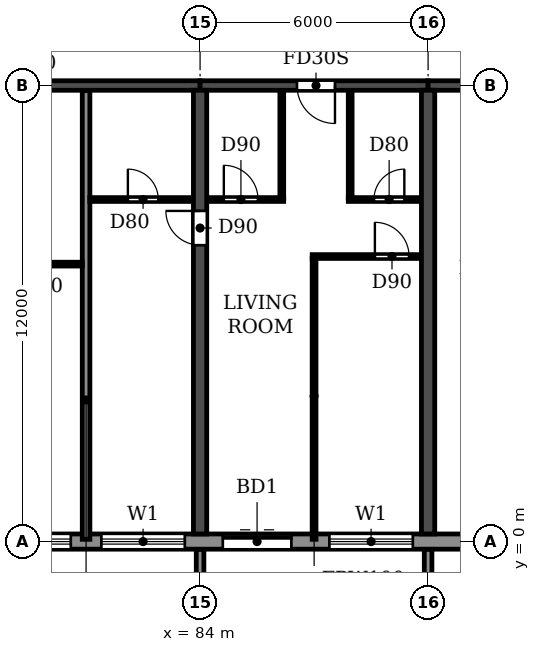
"""IFC4 building model, lengths in metres.
Left out: names, types, materials, properties, quantities, classifications, styles, units other than length and angle.
Written with IfcOpenShell. Run it as: python <this file> out.ifc"""

import sys

from ifc_helpers import new_model, si_unit, direction, frame, frame_2d, origin, place, context, subcontext, project, spatial, polyline, rectangle, outline, extrude, source, transform, mapped, element, fill, save


model = new_model("IFC4")
c1 = context("Model", 3, precision=1e-05, world=origin(), true_north=direction((0.0, 1.0)))
c2 = subcontext(c1, "Body", "Model", "MODEL_VIEW")
j1 = project(units=[si_unit("LENGTHUNIT", "METRE"), si_unit("PLANEANGLEUNIT", "RADIAN")], contexts=[c1])
p1 = place(None, origin())
s1 = spatial("IfcSite", under=j1, at=p1, CompositionType="ELEMENT")
p2 = place(p1, origin())
s2 = spatial("IfcBuilding", under=s1, at=p2, CompositionType="ELEMENT")
p3 = place(p2, frame((0.0, 0.0, 72.9)))
s3 = spatial("IfcBuildingStorey", under=s2, at=p3, CompositionType="ELEMENT", Elevation=72.9)
p4 = place(p3, frame((84.0, 0.2, 0.0), z_axis=(0.0, 0.0, 1.0), x_axis=(0.0, 1.0, 0.0)))
e1 = element("IfcWall", 1, at=p4, inside=s3, PredefinedType="SHEAR", context=c2, shape_type="SweptSolid", body=[
    extrude(rectangle(XDim=11.675, YDim=0.35, at=frame_2d((5.837, 0.0))), origin(), (0.0, 0.0, 1.0), 3.06),
])
p5 = place(p4, frame((7.6, 0.0, 0.0)))
e2 = element("IfcOpeningElement", 2, at=p5, cuts=e1, PredefinedType="OPENING", context=c2, shape_type="SweptSolid", body=[
    extrude(rectangle(XDim=0.9, YDim=2.1, at=frame_2d((0.45, 1.05))), frame((0.0, 0.185, 0.0), z_axis=(0.0, -1.0, 0.0), x_axis=(1.0, 0.0, 0.0)), (0.0, 0.0, 1.0), 0.37),
])
p6 = place(p3, frame((90.0, 0.2, 0.0), z_axis=(0.0, 0.0, 1.0), x_axis=(0.0, 1.0, 0.0)))
e3 = element("IfcWall", 3, at=p6, inside=s3, PredefinedType="SHEAR", context=c2, shape_type="SweptSolid", body=[
    extrude(rectangle(XDim=11.675, YDim=0.35, at=frame_2d((5.837, 0.0))), origin(), (0.0, 0.0, 1.0), 3.06),
])
p7 = place(p3, frame((78.0, 12.0, 0.0), z_axis=(0.0, 0.0, 1.0), x_axis=(1.0, 0.0, 0.0)))
e4 = element("IfcWall", 4, at=p7, inside=s3, PredefinedType="SHEAR", context=c2, shape_type="SweptSolid", body=[
    extrude(rectangle(XDim=6.0, YDim=0.25, at=frame_2d((3.0, 0.0))), origin(), (0.0, 0.0, 1.0), 2.46),
])
p8 = place(p3, frame((84.0, 12.0, 0.0), z_axis=(0.0, 0.0, 1.0), x_axis=(1.0, 0.0, 0.0)))
e5 = element("IfcWall", 5, at=p8, inside=s3, PredefinedType="SHEAR", context=c2, shape_type="SweptSolid", body=[
    extrude(rectangle(XDim=6.0, YDim=0.25, at=frame_2d((3.0, 0.0))), origin(), (0.0, 0.0, 1.0), 2.46),
])
p9 = place(p8, frame((2.55, 0.0, 0.0)))
e6 = element("IfcOpeningElement", 6, at=p9, cuts=e5, PredefinedType="OPENING", context=c2, shape_type="SweptSolid", body=[
    extrude(rectangle(XDim=1.0, YDim=2.1, at=frame_2d((0.5, 1.05))), frame((0.0, 0.135, 0.0), z_axis=(0.0, -1.0, 0.0), x_axis=(1.0, 0.0, 0.0)), (0.0, 0.0, 1.0), 0.27),
])
p10 = place(p3, frame((90.0, 12.0, 0.0), z_axis=(0.0, 0.0, 1.0), x_axis=(1.0, 0.0, 0.0)))
e7 = element("IfcWall", 7, at=p10, inside=s3, PredefinedType="SHEAR", context=c2, shape_type="SweptSolid", body=[
    extrude(rectangle(XDim=5.8, YDim=0.25, at=frame_2d((2.9, 0.0))), origin(), (0.0, 0.0, 1.0), 2.46),
])
p11 = place(p10, frame((2.5, 0.0, 0.0)))
e8 = element("IfcOpeningElement", 8, at=p11, cuts=e7, PredefinedType="OPENING", context=c2, shape_type="SweptSolid", body=[
    extrude(rectangle(XDim=1.0, YDim=2.1, at=frame_2d((0.5, 1.05))), frame((0.0, 0.135, 0.0), z_axis=(0.0, -1.0, 0.0), x_axis=(1.0, 0.0, 0.0)), (0.0, 0.0, 1.0), 0.27),
])
p12 = place(p3, frame((10.683, 0.0, 0.0), z_axis=(0.0, 0.0, 1.0), x_axis=(1.0, 0.0, 0.0)))
e9 = element("IfcWall", 9, at=p12, inside=s3, PredefinedType="STANDARD", context=c2, shape_type="SweptSolid", body=[
    extrude(rectangle(XDim=80.634, YDim=0.4, at=frame_2d((40.317, 0.0))), origin(), (0.0, 0.0, 1.0), 3.06),
])
p13 = place(p12, frame((1.717, 0.0, 0.9)))
e10 = element("IfcOpeningElement", 10, at=p13, cuts=e9, PredefinedType="OPENING", context=c2, shape_type="SweptSolid", body=[
    extrude(rectangle(XDim=2.2, YDim=1.5, at=frame_2d((1.1, 0.75))), frame((0.0, 0.21, 0.0), z_axis=(0.0, -1.0, 0.0), x_axis=(1.0, 0.0, 0.0)), (0.0, 0.0, 1.0), 0.42),
])
p14 = place(p12, frame((4.917, 0.0, 0.0)))
e11 = element("IfcOpeningElement", 11, at=p14, cuts=e9, PredefinedType="OPENING", context=c2, shape_type="SweptSolid", body=[
    extrude(rectangle(XDim=1.8, YDim=2.4, at=frame_2d((0.9, 1.2))), frame((0.0, 0.21, 0.0), z_axis=(0.0, -1.0, 0.0), x_axis=(1.0, 0.0, 0.0)), (0.0, 0.0, 1.0), 0.42),
])
p15 = place(p12, frame((7.717, 0.0, 0.9)))
e12 = element("IfcOpeningElement", 12, at=p15, cuts=e9, PredefinedType="OPENING", context=c2, shape_type="SweptSolid", body=[
    extrude(rectangle(XDim=2.2, YDim=1.5, at=frame_2d((1.1, 0.75))), frame((0.0, 0.21, 0.0), z_axis=(0.0, -1.0, 0.0), x_axis=(1.0, 0.0, 0.0)), (0.0, 0.0, 1.0), 0.42),
])
p16 = place(p12, frame((10.717, 0.0, 0.9)))
e13 = element("IfcOpeningElement", 13, at=p16, cuts=e9, PredefinedType="OPENING", context=c2, shape_type="SweptSolid", body=[
    extrude(rectangle(XDim=2.2, YDim=1.5, at=frame_2d((1.1, 0.75))), frame((0.0, 0.21, 0.0), z_axis=(0.0, -1.0, 0.0), x_axis=(1.0, 0.0, 0.0)), (0.0, 0.0, 1.0), 0.42),
])
p17 = place(p12, frame((13.717, 0.0, 0.9)))
e14 = element("IfcOpeningElement", 14, at=p17, cuts=e9, PredefinedType="OPENING", context=c2, shape_type="SweptSolid", body=[
    extrude(rectangle(XDim=2.2, YDim=1.5, at=frame_2d((1.1, 0.75))), frame((0.0, 0.21, 0.0), z_axis=(0.0, -1.0, 0.0), x_axis=(1.0, 0.0, 0.0)), (0.0, 0.0, 1.0), 0.42),
])
p18 = place(p12, frame((16.917, 0.0, 0.0)))
e15 = element("IfcOpeningElement", 15, at=p18, cuts=e9, PredefinedType="OPENING", context=c2, shape_type="SweptSolid", body=[
    extrude(rectangle(XDim=1.8, YDim=2.4, at=frame_2d((0.9, 1.2))), frame((0.0, 0.21, 0.0), z_axis=(0.0, -1.0, 0.0), x_axis=(1.0, 0.0, 0.0)), (0.0, 0.0, 1.0), 0.42),
])
p19 = place(p12, frame((19.717, 0.0, 0.9)))
e16 = element("IfcOpeningElement", 16, at=p19, cuts=e9, PredefinedType="OPENING", context=c2, shape_type="SweptSolid", body=[
    extrude(rectangle(XDim=2.2, YDim=1.5, at=frame_2d((1.1, 0.75))), frame((0.0, 0.21, 0.0), z_axis=(0.0, -1.0, 0.0), x_axis=(1.0, 0.0, 0.0)), (0.0, 0.0, 1.0), 0.42),
])
p20 = place(p12, frame((22.717, 0.0, 0.9)))
e17 = element("IfcOpeningElement", 17, at=p20, cuts=e9, PredefinedType="OPENING", context=c2, shape_type="SweptSolid", body=[
    extrude(rectangle(XDim=2.2, YDim=1.5, at=frame_2d((1.1, 0.75))), frame((0.0, 0.21, 0.0), z_axis=(0.0, -1.0, 0.0), x_axis=(1.0, 0.0, 0.0)), (0.0, 0.0, 1.0), 0.42),
])
p21 = place(p12, frame((25.917, 0.0, 0.0)))
e18 = element("IfcOpeningElement", 18, at=p21, cuts=e9, PredefinedType="OPENING", context=c2, shape_type="SweptSolid", body=[
    extrude(rectangle(XDim=1.8, YDim=2.4, at=frame_2d((0.9, 1.2))), frame((0.0, 0.21, 0.0), z_axis=(0.0, -1.0, 0.0), x_axis=(1.0, 0.0, 0.0)), (0.0, 0.0, 1.0), 0.42),
])
p22 = place(p12, frame((28.717, 0.0, 0.9)))
e19 = element("IfcOpeningElement", 19, at=p22, cuts=e9, PredefinedType="OPENING", context=c2, shape_type="SweptSolid", body=[
    extrude(rectangle(XDim=2.2, YDim=1.5, at=frame_2d((1.1, 0.75))), frame((0.0, 0.21, 0.0), z_axis=(0.0, -1.0, 0.0), x_axis=(1.0, 0.0, 0.0)), (0.0, 0.0, 1.0), 0.42),
])
p23 = place(p12, frame((31.717, 0.0, 0.9)))
e20 = element("IfcOpeningElement", 20, at=p23, cuts=e9, PredefinedType="OPENING", context=c2, shape_type="SweptSolid", body=[
    extrude(rectangle(XDim=2.2, YDim=1.5, at=frame_2d((1.1, 0.75))), frame((0.0, 0.21, 0.0), z_axis=(0.0, -1.0, 0.0), x_axis=(1.0, 0.0, 0.0)), (0.0, 0.0, 1.0), 0.42),
])
p24 = place(p12, frame((34.717, 0.0, 0.9)))
e21 = element("IfcOpeningElement", 21, at=p24, cuts=e9, PredefinedType="OPENING", context=c2, shape_type="SweptSolid", body=[
    extrude(rectangle(XDim=2.2, YDim=1.5, at=frame_2d((1.1, 0.75))), frame((0.0, 0.21, 0.0), z_axis=(0.0, -1.0, 0.0), x_axis=(1.0, 0.0, 0.0)), (0.0, 0.0, 1.0), 0.42),
])
p25 = place(p12, frame((37.917, 0.0, 0.0)))
e22 = element("IfcOpeningElement", 22, at=p25, cuts=e9, PredefinedType="OPENING", context=c2, shape_type="SweptSolid", body=[
    extrude(rectangle(XDim=1.8, YDim=2.4, at=frame_2d((0.9, 1.2))), frame((0.0, 0.21, 0.0), z_axis=(0.0, -1.0, 0.0), x_axis=(1.0, 0.0, 0.0)), (0.0, 0.0, 1.0), 0.42),
])
p26 = place(p12, frame((40.717, 0.0, 0.9)))
e23 = element("IfcOpeningElement", 23, at=p26, cuts=e9, PredefinedType="OPENING", context=c2, shape_type="SweptSolid", body=[
    extrude(rectangle(XDim=2.2, YDim=1.5, at=frame_2d((1.1, 0.75))), frame((0.0, 0.21, 0.0), z_axis=(0.0, -1.0, 0.0), x_axis=(1.0, 0.0, 0.0)), (0.0, 0.0, 1.0), 0.42),
])
p27 = place(p12, frame((43.717, 0.0, 0.9)))
e24 = element("IfcOpeningElement", 24, at=p27, cuts=e9, PredefinedType="OPENING", context=c2, shape_type="SweptSolid", body=[
    extrude(rectangle(XDim=2.2, YDim=1.5, at=frame_2d((1.1, 0.75))), frame((0.0, 0.21, 0.0), z_axis=(0.0, -1.0, 0.0), x_axis=(1.0, 0.0, 0.0)), (0.0, 0.0, 1.0), 0.42),
])
p28 = place(p12, frame((46.717, 0.0, 0.9)))
e25 = element("IfcOpeningElement", 25, at=p28, cuts=e9, PredefinedType="OPENING", context=c2, shape_type="SweptSolid", body=[
    extrude(rectangle(XDim=2.2, YDim=1.5, at=frame_2d((1.1, 0.75))), frame((0.0, 0.21, 0.0), z_axis=(0.0, -1.0, 0.0), x_axis=(1.0, 0.0, 0.0)), (0.0, 0.0, 1.0), 0.42),
])
p29 = place(p12, frame((49.917, 0.0, 0.0)))
e26 = element("IfcOpeningElement", 26, at=p29, cuts=e9, PredefinedType="OPENING", context=c2, shape_type="SweptSolid", body=[
    extrude(rectangle(XDim=1.8, YDim=2.4, at=frame_2d((0.9, 1.2))), frame((0.0, 0.21, 0.0), z_axis=(0.0, -1.0, 0.0), x_axis=(1.0, 0.0, 0.0)), (0.0, 0.0, 1.0), 0.42),
])
p30 = place(p12, frame((52.717, 0.0, 0.9)))
e27 = element("IfcOpeningElement", 27, at=p30, cuts=e9, PredefinedType="OPENING", context=c2, shape_type="SweptSolid", body=[
    extrude(rectangle(XDim=2.2, YDim=1.5, at=frame_2d((1.1, 0.75))), frame((0.0, 0.21, 0.0), z_axis=(0.0, -1.0, 0.0), x_axis=(1.0, 0.0, 0.0)), (0.0, 0.0, 1.0), 0.42),
])
p31 = place(p12, frame((55.717, 0.0, 0.9)))
e28 = element("IfcOpeningElement", 28, at=p31, cuts=e9, PredefinedType="OPENING", context=c2, shape_type="SweptSolid", body=[
    extrude(rectangle(XDim=2.2, YDim=1.5, at=frame_2d((1.1, 0.75))), frame((0.0, 0.21, 0.0), z_axis=(0.0, -1.0, 0.0), x_axis=(1.0, 0.0, 0.0)), (0.0, 0.0, 1.0), 0.42),
])
p32 = place(p12, frame((58.717, 0.0, 0.9)))
e29 = element("IfcOpeningElement", 29, at=p32, cuts=e9, PredefinedType="OPENING", context=c2, shape_type="SweptSolid", body=[
    extrude(rectangle(XDim=2.2, YDim=1.5, at=frame_2d((1.1, 0.75))), frame((0.0, 0.21, 0.0), z_axis=(0.0, -1.0, 0.0), x_axis=(1.0, 0.0, 0.0)), (0.0, 0.0, 1.0), 0.42),
])
p33 = place(p12, frame((61.717, 0.0, 0.9)))
e30 = element("IfcOpeningElement", 30, at=p33, cuts=e9, PredefinedType="OPENING", context=c2, shape_type="SweptSolid", body=[
    extrude(rectangle(XDim=2.2, YDim=1.5, at=frame_2d((1.1, 0.75))), frame((0.0, 0.21, 0.0), z_axis=(0.0, -1.0, 0.0), x_axis=(1.0, 0.0, 0.0)), (0.0, 0.0, 1.0), 0.42),
])
p34 = place(p12, frame((64.917, 0.0, 0.0)))
e31 = element("IfcOpeningElement", 31, at=p34, cuts=e9, PredefinedType="OPENING", context=c2, shape_type="SweptSolid", body=[
    extrude(rectangle(XDim=1.8, YDim=2.4, at=frame_2d((0.9, 1.2))), frame((0.0, 0.21, 0.0), z_axis=(0.0, -1.0, 0.0), x_axis=(1.0, 0.0, 0.0)), (0.0, 0.0, 1.0), 0.42),
])
p35 = place(p12, frame((67.717, 0.0, 0.9)))
e32 = element("IfcOpeningElement", 32, at=p35, cuts=e9, PredefinedType="OPENING", context=c2, shape_type="SweptSolid", body=[
    extrude(rectangle(XDim=2.2, YDim=1.5, at=frame_2d((1.1, 0.75))), frame((0.0, 0.21, 0.0), z_axis=(0.0, -1.0, 0.0), x_axis=(1.0, 0.0, 0.0)), (0.0, 0.0, 1.0), 0.42),
])
p36 = place(p12, frame((70.717, 0.0, 0.9)))
e33 = element("IfcOpeningElement", 33, at=p36, cuts=e9, PredefinedType="OPENING", context=c2, shape_type="SweptSolid", body=[
    extrude(rectangle(XDim=2.2, YDim=1.5, at=frame_2d((1.1, 0.75))), frame((0.0, 0.21, 0.0), z_axis=(0.0, -1.0, 0.0), x_axis=(1.0, 0.0, 0.0)), (0.0, 0.0, 1.0), 0.42),
])
p37 = place(p12, frame((73.917, 0.0, 0.0)))
e34 = element("IfcOpeningElement", 34, at=p37, cuts=e9, PredefinedType="OPENING", context=c2, shape_type="SweptSolid", body=[
    extrude(rectangle(XDim=1.8, YDim=2.4, at=frame_2d((0.9, 1.2))), frame((0.0, 0.21, 0.0), z_axis=(0.0, -1.0, 0.0), x_axis=(1.0, 0.0, 0.0)), (0.0, 0.0, 1.0), 0.42),
])
p38 = place(p12, frame((76.717, 0.0, 0.9)))
e35 = element("IfcOpeningElement", 35, at=p38, cuts=e9, PredefinedType="OPENING", context=c2, shape_type="SweptSolid", body=[
    extrude(rectangle(XDim=2.2, YDim=1.5, at=frame_2d((1.1, 0.75))), frame((0.0, 0.21, 0.0), z_axis=(0.0, -1.0, 0.0), x_axis=(1.0, 0.0, 0.0)), (0.0, 0.0, 1.0), 0.42),
])
m1 = source(origin(), c2, "Body", "SweptSolid", [
    extrude(outline(polyline([(0.0, 0.0), (0.2, 0.0), (0.2, 1.65), (0.0, 1.65), (0.0, 0.0)])), origin(), (0.0, 0.0, 1.0), 3.1),
])
for number, where in (
    (36, (83.9, -1.85, 0.0)),
    (37, (89.9, -1.85, 0.0)),
):
    element("IfcWall", number, at=place(p3, frame(where)), inside=s3, PredefinedType="STANDARD", context=c2, shape_type="MappedRepresentation", body=[
        mapped(m1, transform((0.0, 0.0, 0.0))),
    ])
p39 = place(p3, frame((81.0, 0.06, 0.0), z_axis=(0.0, 0.0, 1.0), x_axis=(0.0, 1.0, 0.0)))
e38 = element("IfcWall", 38, at=p39, inside=s3, PredefinedType="PARTITIONING", context=c2, shape_type="SweptSolid", body=[
    extrude(rectangle(XDim=11.805, YDim=0.2, at=frame_2d((5.902, 0.0))), origin(), (0.0, 0.0, 1.0), 3.06),
])
p40 = place(p3, frame((78.185, 7.3, 0.0), z_axis=(0.0, 0.0, 1.0), x_axis=(1.0, 0.0, 0.0)))
e39 = element("IfcWall", 39, at=p40, inside=s3, PredefinedType="PARTITIONING", context=c2, shape_type="SweptSolid", body=[
    extrude(rectangle(XDim=2.715, YDim=0.1, at=frame_2d((1.357, 0.0))), origin(), (0.0, 0.0, 1.0), 3.06),
])
p41 = place(p40, frame((0.915, 0.0, 0.0)))
e40 = element("IfcOpeningElement", 40, at=p41, cuts=e39, PredefinedType="OPENING", context=c2, shape_type="SweptSolid", body=[
    extrude(rectangle(XDim=0.8, YDim=2.1, at=frame_2d((0.4, 1.05))), frame((0.0, 0.06, 0.0), z_axis=(0.0, -1.0, 0.0), x_axis=(1.0, 0.0, 0.0)), (0.0, 0.0, 1.0), 0.12),
])
p42 = place(p3, frame((86.95, 7.5, 0.0), z_axis=(0.0, 0.0, 1.0), x_axis=(1.0, 0.0, 0.0)))
e41 = element("IfcWall", 41, at=p42, inside=s3, PredefinedType="PARTITIONING", context=c2, shape_type="SweptSolid", body=[
    extrude(rectangle(XDim=2.865, YDim=0.1, at=frame_2d((1.433, 0.0))), origin(), (0.0, 0.0, 1.0), 3.06),
])
p43 = place(p42, frame((1.65, 0.0, 0.0)))
e42 = element("IfcOpeningElement", 42, at=p43, cuts=e41, PredefinedType="OPENING", context=c2, shape_type="SweptSolid", body=[
    extrude(rectangle(XDim=0.9, YDim=2.1, at=frame_2d((0.45, 1.05))), frame((0.0, 0.06, 0.0), z_axis=(0.0, -1.0, 0.0), x_axis=(1.0, 0.0, 0.0)), (0.0, 0.0, 1.0), 0.12),
])
p44 = place(p3, frame((81.1, 9.0, 0.0), z_axis=(0.0, 0.0, 1.0), x_axis=(1.0, 0.0, 0.0)))
e43 = element("IfcWall", 43, at=p44, inside=s3, PredefinedType="PARTITIONING", context=c2, shape_type="SweptSolid", body=[
    extrude(rectangle(XDim=2.715, YDim=0.1, at=frame_2d((1.357, 0.0))), origin(), (0.0, 0.0, 1.0), 3.06),
])
p45 = place(p44, frame((1.0, 0.0, 0.0)))
e44 = element("IfcOpeningElement", 44, at=p45, cuts=e43, PredefinedType="OPENING", context=c2, shape_type="SweptSolid", body=[
    extrude(rectangle(XDim=0.8, YDim=2.1, at=frame_2d((0.4, 1.05))), frame((0.0, 0.06, 0.0), z_axis=(0.0, -1.0, 0.0), x_axis=(1.0, 0.0, 0.0)), (0.0, 0.0, 1.0), 0.12),
])
p46 = place(p3, frame((84.185, 9.0, 0.0), z_axis=(0.0, 0.0, 1.0), x_axis=(1.0, 0.0, 0.0)))
e45 = element("IfcWall", 45, at=p46, inside=s3, PredefinedType="PARTITIONING", context=c2, shape_type="SweptSolid", body=[
    extrude(rectangle(XDim=2.015, YDim=0.1, at=frame_2d((1.007, 0.0))), origin(), (0.0, 0.0, 1.0), 3.06),
])
p47 = place(p46, frame((0.44, 0.0, 0.0)))
e46 = element("IfcOpeningElement", 46, at=p47, cuts=e45, PredefinedType="OPENING", context=c2, shape_type="SweptSolid", body=[
    extrude(rectangle(XDim=0.9, YDim=2.1, at=frame_2d((0.45, 1.05))), frame((0.0, 0.06, 0.0), z_axis=(0.0, -1.0, 0.0), x_axis=(1.0, 0.0, 0.0)), (0.0, 0.0, 1.0), 0.12),
])
p48 = place(p3, frame((87.9, 9.0, 0.0), z_axis=(0.0, 0.0, 1.0), x_axis=(1.0, 0.0, 0.0)))
e47 = element("IfcWall", 47, at=p48, inside=s3, PredefinedType="PARTITIONING", context=c2, shape_type="SweptSolid", body=[
    extrude(rectangle(XDim=1.915, YDim=0.1, at=frame_2d((0.958, 0.0))), origin(), (0.0, 0.0, 1.0), 3.06),
])
p49 = place(p48, frame((0.675, 0.0, 0.0)))
e48 = element("IfcOpeningElement", 48, at=p49, cuts=e47, PredefinedType="OPENING", context=c2, shape_type="SweptSolid", body=[
    extrude(rectangle(XDim=0.8, YDim=2.1, at=frame_2d((0.4, 1.05))), frame((0.0, 0.06, 0.0), z_axis=(0.0, -1.0, 0.0), x_axis=(1.0, 0.0, 0.0)), (0.0, 0.0, 1.0), 0.12),
])
p50 = place(p3, frame((86.15, 9.05, 0.0), z_axis=(0.0, 0.0, 1.0), x_axis=(0.0, 1.0, 0.0)))
e49 = element("IfcWall", 49, at=p50, inside=s3, PredefinedType="PARTITIONING", context=c2, shape_type="SweptSolid", body=[
    extrude(rectangle(XDim=2.815, YDim=0.1, at=frame_2d((1.407, 0.0))), origin(), (0.0, 0.0, 1.0), 3.06),
])
p51 = place(p3, frame((87.0, 0.06, 0.0), z_axis=(0.0, 0.0, 1.0), x_axis=(0.0, 1.0, 0.0)))
e50 = element("IfcWall", 50, at=p51, inside=s3, PredefinedType="PARTITIONING", context=c2, shape_type="SweptSolid", body=[
    extrude(rectangle(XDim=7.39, YDim=0.1, at=frame_2d((3.695, 0.0))), origin(), (0.0, 0.0, 1.0), 3.06),
])
p52 = place(p3, frame((87.95, 9.05, 0.0), z_axis=(0.0, 0.0, 1.0), x_axis=(0.0, 1.0, 0.0)))
e51 = element("IfcWall", 51, at=p52, inside=s3, PredefinedType="PARTITIONING", context=c2, shape_type="SweptSolid", body=[
    extrude(rectangle(XDim=2.815, YDim=0.1, at=frame_2d((1.407, 0.0))), origin(), (0.0, 0.0, 1.0), 3.06),
])
p53 = place(p35, origin())
e52 = element("IfcWindow", 52, at=p53, inside=s3, PartitioningType="DOUBLE_PANEL_HORIZONTAL", PredefinedType="WINDOW", context=c2, shape_type="SweptSolid", body=[
    extrude(rectangle(XDim=2.2, YDim=1.5, at=frame_2d((1.1, 0.75))), frame((0.0, 0.03, 0.0), z_axis=(0.0, -1.0, 0.0), x_axis=(1.0, 0.0, 0.0)), (0.0, 0.0, 1.0), 0.06),
])
fill(e32, e52)
p54 = place(p36, origin())
e53 = element("IfcWindow", 53, at=p54, inside=s3, PartitioningType="DOUBLE_PANEL_HORIZONTAL", PredefinedType="WINDOW", context=c2, shape_type="SweptSolid", body=[
    extrude(rectangle(XDim=2.2, YDim=1.5, at=frame_2d((1.1, 0.75))), frame((0.0, 0.03, 0.0), z_axis=(0.0, -1.0, 0.0), x_axis=(1.0, 0.0, 0.0)), (0.0, 0.0, 1.0), 0.06),
])
fill(e33, e53)
p55 = place(p37, origin())
e54 = element("IfcDoor", 54, at=p55, inside=s3, OperationType="DOUBLE_DOOR_SLIDING", PredefinedType="DOOR", context=c2, shape_type="SweptSolid", body=[
    extrude(rectangle(XDim=1.8, YDim=2.4, at=frame_2d((0.9, 1.2))), frame((0.0, 0.025, 0.0), z_axis=(0.0, -1.0, 0.0), x_axis=(1.0, 0.0, 0.0)), (0.0, 0.0, 1.0), 0.05),
])
fill(e34, e54)
p56 = place(p38, origin())
e55 = element("IfcWindow", 55, at=p56, inside=s3, PartitioningType="DOUBLE_PANEL_HORIZONTAL", PredefinedType="WINDOW", context=c2, shape_type="SweptSolid", body=[
    extrude(rectangle(XDim=2.2, YDim=1.5, at=frame_2d((1.1, 0.75))), frame((0.0, 0.03, 0.0), z_axis=(0.0, -1.0, 0.0), x_axis=(1.0, 0.0, 0.0)), (0.0, 0.0, 1.0), 0.06),
])
fill(e35, e55)
p57 = place(p45, origin())
e56 = element("IfcDoor", 56, at=p57, inside=s3, OperationType="SINGLE_SWING_LEFT", PredefinedType="DOOR", context=c2, shape_type="SweptSolid", body=[
    extrude(rectangle(XDim=0.8, YDim=2.1, at=frame_2d((0.4, 1.05))), frame((0.0, 0.025, 0.0), z_axis=(0.0, -1.0, 0.0), x_axis=(1.0, 0.0, 0.0)), (0.0, 0.0, 1.0), 0.05),
])
fill(e44, e56)
p58 = place(p5, origin())
e57 = element("IfcDoor", 57, at=p58, inside=s3, OperationType="SINGLE_SWING_RIGHT", PredefinedType="DOOR", context=c2, shape_type="SweptSolid", body=[
    extrude(rectangle(XDim=0.9, YDim=2.1, at=frame_2d((0.45, 1.05))), frame((0.0, 0.025, 0.0), z_axis=(0.0, -1.0, 0.0), x_axis=(1.0, 0.0, 0.0)), (0.0, 0.0, 1.0), 0.05),
])
fill(e2, e57)
p59 = place(p47, origin())
e58 = element("IfcDoor", 58, at=p59, inside=s3, OperationType="SINGLE_SWING_LEFT", PredefinedType="DOOR", context=c2, shape_type="SweptSolid", body=[
    extrude(rectangle(XDim=0.9, YDim=2.1, at=frame_2d((0.45, 1.05))), frame((0.0, 0.025, 0.0), z_axis=(0.0, -1.0, 0.0), x_axis=(1.0, 0.0, 0.0)), (0.0, 0.0, 1.0), 0.05),
])
fill(e46, e58)
p60 = place(p9, frame((1.0, 0.0, 0.0), z_axis=(0.0, 0.0, 1.0), x_axis=(-1.0, 0.0, 0.0)))
e59 = element("IfcDoor", 59, at=p60, inside=s3, OperationType="SINGLE_SWING_LEFT", PredefinedType="DOOR", context=c2, shape_type="SweptSolid", body=[
    extrude(rectangle(XDim=1.0, YDim=2.1, at=frame_2d((0.5, 1.05))), frame((0.0, 0.025, 0.0), z_axis=(0.0, -1.0, 0.0), x_axis=(1.0, 0.0, 0.0)), (0.0, 0.0, 1.0), 0.05),
])
fill(e6, e59)
p61 = place(p49, origin())
e60 = element("IfcDoor", 60, at=p61, inside=s3, OperationType="SINGLE_SWING_RIGHT", PredefinedType="DOOR", context=c2, shape_type="SweptSolid", body=[
    extrude(rectangle(XDim=0.8, YDim=2.1, at=frame_2d((0.4, 1.05))), frame((0.0, 0.025, 0.0), z_axis=(0.0, -1.0, 0.0), x_axis=(1.0, 0.0, 0.0)), (0.0, 0.0, 1.0), 0.05),
])
fill(e48, e60)
p62 = place(p43, origin())
e61 = element("IfcDoor", 61, at=p62, inside=s3, OperationType="SINGLE_SWING_LEFT", PredefinedType="DOOR", context=c2, shape_type="SweptSolid", body=[
    extrude(rectangle(XDim=0.9, YDim=2.1, at=frame_2d((0.45, 1.05))), frame((0.0, 0.025, 0.0), z_axis=(0.0, -1.0, 0.0), x_axis=(1.0, 0.0, 0.0)), (0.0, 0.0, 1.0), 0.05),
])
fill(e42, e61)
save(model, sys.argv[1])
